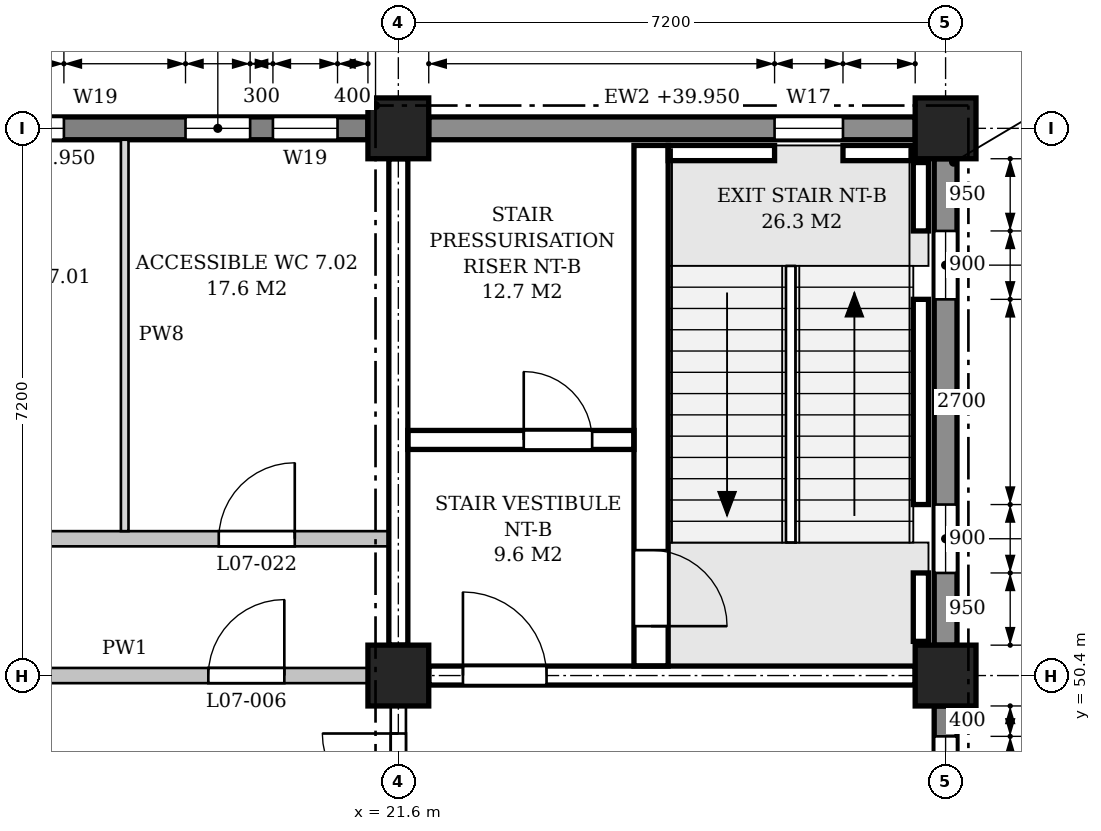
"""IFC4 building model, lengths in metres.
Left out: names, types, materials, properties, quantities, classifications, styles, units other than length and angle.
Written with IfcOpenShell. Run it as: python <this file> out.ifc"""

import sys

from ifc_helpers import new_model, si_unit, direction, frame, frame_2d, origin, origin_2d, place, context, subcontext, project, spatial, polyline, rectangle, outline, extrude, element, fill, save


model = new_model("IFC4")
c1 = context("Model", 3, precision=1e-05, world=origin(), true_north=direction((0.0, 1.0)))
c2 = subcontext(c1, "Body", "Model", "MODEL_VIEW")
j1 = project(units=[si_unit("LENGTHUNIT", "METRE"), si_unit("PLANEANGLEUNIT", "RADIAN")], contexts=[c1])
p1 = place(None, origin())
s1 = spatial("IfcSite", under=j1, at=p1, CompositionType="ELEMENT")
p2 = place(p1, origin())
s2 = spatial("IfcBuilding", under=s1, at=p2, CompositionType="ELEMENT")
p3 = place(p2, frame((0.0, 0.0, 36.0)))
s3 = spatial("IfcBuildingStorey", under=s2, at=p3, CompositionType="ELEMENT", Elevation=36.0)
for number, where, z_axis, x_axis in (
    (1, (21.6, 50.4, 0.0), (0.0, 0.0, 1.0), (1.0, 0.0, 0.0)),
    (2, (21.6, 57.6, 0.0), (0.0, 0.0, 1.0), (1.0, 0.0, 0.0)),
    (3, (28.8, 50.4, 0.0), (0.0, 0.0, 1.0), (1.0, 0.0, 0.0)),
    (4, (28.8, 57.6, 0.0), (0.0, 0.0, 1.0), (1.0, 0.0, 0.0)),
):
    element("IfcColumn", number, at=place(p3, frame(where, z_axis=z_axis, x_axis=x_axis)), inside=s3, PredefinedType="COLUMN", context=c2, shape_type="SweptSolid", body=[
        extrude(rectangle(XDim=0.8, YDim=0.8, at=origin_2d()), origin(), (0.0, 0.0, 1.0), 4.8),
    ])
p4 = place(p3, frame((28.4, 57.6, 0.0), z_axis=(0.0, 0.0, 1.0), x_axis=(-1.0, 0.0, 0.0)))
e5 = element("IfcWall", 5, at=p4, inside=s3, PredefinedType="STANDARD", context=c2, shape_type="SweptSolid", body=[
    extrude(rectangle(XDim=6.4, YDim=0.3, at=frame_2d((3.2, 0.0))), origin(), (0.0, 0.0, 1.0), 3.95),
])
p5 = place(p4, frame((0.95, 0.0, 0.9)))
e6 = element("IfcOpeningElement", 6, at=p5, cuts=e5, PredefinedType="OPENING", context=c2, shape_type="SweptSolid", body=[
    extrude(outline(polyline([(0.0, 0.0), (0.9, 0.0), (0.9, 2.55), (0.45, 3.0), (0.0, 2.55), (0.0, 0.0)])), frame((0.0, 0.16, 0.0), z_axis=(0.0, -1.0, 0.0), x_axis=(1.0, 0.0, 0.0)), (0.0, 0.0, 1.0), 0.32),
])
p6 = place(p3, frame((21.2, 57.6, 0.0), z_axis=(0.0, 0.0, 1.0), x_axis=(-1.0, 0.0, 0.0)))
e7 = element("IfcWall", 7, at=p6, inside=s3, PredefinedType="STANDARD", context=c2, shape_type="SweptSolid", body=[
    extrude(rectangle(XDim=6.4, YDim=0.3, at=frame_2d((3.2, 0.0))), origin(), (0.0, 0.0, 1.0), 3.95),
])
p7 = place(p6, frame((0.4, 0.0, 0.9)))
e8 = element("IfcOpeningElement", 8, at=p7, cuts=e7, PredefinedType="OPENING", context=c2, shape_type="SweptSolid", body=[
    extrude(outline(polyline([(0.0, 0.0), (0.85, 0.0), (0.85, 2.55), (0.425, 3.0), (0.0, 2.55), (0.0, 0.0)])), frame((0.0, 0.16, 0.0), z_axis=(0.0, -1.0, 0.0), x_axis=(1.0, 0.0, 0.0)), (0.0, 0.0, 1.0), 0.32),
])
p8 = place(p6, frame((1.55, 0.0, 0.9)))
e9 = element("IfcOpeningElement", 9, at=p8, cuts=e7, PredefinedType="OPENING", context=c2, shape_type="SweptSolid", body=[
    extrude(outline(polyline([(0.0, 0.0), (0.85, 0.0), (0.85, 2.55), (0.425, 3.0), (0.0, 2.55), (0.0, 0.0)])), frame((0.0, 0.16, 0.0), z_axis=(0.0, -1.0, 0.0), x_axis=(1.0, 0.0, 0.0)), (0.0, 0.0, 1.0), 0.32),
])
p9 = place(p6, frame((4.0, 0.0, 0.9)))
e10 = element("IfcOpeningElement", 10, at=p9, cuts=e7, PredefinedType="OPENING", context=c2, shape_type="SweptSolid", body=[
    extrude(outline(polyline([(0.0, 0.0), (0.85, 0.0), (0.85, 2.55), (0.425, 3.0), (0.0, 2.55), (0.0, 0.0)])), frame((0.0, 0.16, 0.0), z_axis=(0.0, -1.0, 0.0), x_axis=(1.0, 0.0, 0.0)), (0.0, 0.0, 1.0), 0.32),
])
p10 = place(p6, frame((5.15, 0.0, 0.9)))
e11 = element("IfcOpeningElement", 11, at=p10, cuts=e7, PredefinedType="OPENING", context=c2, shape_type="SweptSolid", body=[
    extrude(outline(polyline([(0.0, 0.0), (0.85, 0.0), (0.85, 2.55), (0.425, 3.0), (0.0, 2.55), (0.0, 0.0)])), frame((0.0, 0.16, 0.0), z_axis=(0.0, -1.0, 0.0), x_axis=(1.0, 0.0, 0.0)), (0.0, 0.0, 1.0), 0.32),
])
p11 = place(p3, frame((28.8, 43.6, 0.0), z_axis=(0.0, 0.0, 1.0), x_axis=(0.0, 1.0, 0.0)))
e12 = element("IfcWall", 12, at=p11, inside=s3, PredefinedType="STANDARD", context=c2, shape_type="SweptSolid", body=[
    extrude(rectangle(XDim=6.4, YDim=0.3, at=frame_2d((3.2, 0.0))), origin(), (0.0, 0.0, 1.0), 3.95),
])
p12 = place(p11, frame((4.0, 0.0, 0.9)))
e13 = element("IfcOpeningElement", 13, at=p12, cuts=e12, PredefinedType="OPENING", context=c2, shape_type="SweptSolid", body=[
    extrude(outline(polyline([(0.0, 0.0), (0.85, 0.0), (0.85, 2.55), (0.425, 3.0), (0.0, 2.55), (0.0, 0.0)])), frame((0.0, 0.16, 0.0), z_axis=(0.0, -1.0, 0.0), x_axis=(1.0, 0.0, 0.0)), (0.0, 0.0, 1.0), 0.32),
])
p13 = place(p11, frame((5.15, 0.0, 0.9)))
e14 = element("IfcOpeningElement", 14, at=p13, cuts=e12, PredefinedType="OPENING", context=c2, shape_type="SweptSolid", body=[
    extrude(outline(polyline([(0.0, 0.0), (0.85, 0.0), (0.85, 2.55), (0.425, 3.0), (0.0, 2.55), (0.0, 0.0)])), frame((0.0, 0.16, 0.0), z_axis=(0.0, -1.0, 0.0), x_axis=(1.0, 0.0, 0.0)), (0.0, 0.0, 1.0), 0.32),
])
p14 = place(p3, frame((28.8, 50.8, 0.0), z_axis=(0.0, 0.0, 1.0), x_axis=(0.0, 1.0, 0.0)))
e15 = element("IfcWall", 15, at=p14, inside=s3, PredefinedType="STANDARD", context=c2, shape_type="SweptSolid", body=[
    extrude(rectangle(XDim=6.4, YDim=0.3, at=frame_2d((3.2, 0.0))), origin(), (0.0, 0.0, 1.0), 3.95),
])
p15 = place(p14, frame((0.95, 0.0, 0.9)))
e16 = element("IfcOpeningElement", 16, at=p15, cuts=e15, PredefinedType="OPENING", context=c2, shape_type="SweptSolid", body=[
    extrude(outline(polyline([(0.0, 0.0), (0.9, 0.0), (0.9, 2.55), (0.45, 3.0), (0.0, 2.55), (0.0, 0.0)])), frame((0.0, 0.16, 0.0), z_axis=(0.0, -1.0, 0.0), x_axis=(1.0, 0.0, 0.0)), (0.0, 0.0, 1.0), 0.32),
])
p16 = place(p14, frame((4.55, 0.0, 0.9)))
e17 = element("IfcOpeningElement", 17, at=p16, cuts=e15, PredefinedType="OPENING", context=c2, shape_type="SweptSolid", body=[
    extrude(outline(polyline([(0.0, 0.0), (0.9, 0.0), (0.9, 2.55), (0.45, 3.0), (0.0, 2.55), (0.0, 0.0)])), frame((0.0, 0.16, 0.0), z_axis=(0.0, -1.0, 0.0), x_axis=(1.0, 0.0, 0.0)), (0.0, 0.0, 1.0), 0.32),
])
p17 = place(p3, frame((22.0, 50.4, 0.0), z_axis=(0.0, 0.0, 1.0), x_axis=(1.0, 0.0, 0.0)))
e18 = element("IfcWall", 18, at=p17, inside=s3, PredefinedType="SHEAR", context=c2, shape_type="SweptSolid", body=[
    extrude(rectangle(XDim=6.4, YDim=0.25, at=frame_2d((3.2, 0.0))), origin(), (0.0, 0.0, 1.0), 3.85),
])
p18 = place(p17, frame((0.45, 0.0, 0.0)))
e19 = element("IfcOpeningElement", 19, at=p18, cuts=e18, PredefinedType="OPENING", context=c2, shape_type="SweptSolid", body=[
    extrude(rectangle(XDim=1.1, YDim=2.1, at=frame_2d((0.55, 1.05))), frame((0.0, 0.135, 0.0), z_axis=(0.0, -1.0, 0.0), x_axis=(1.0, 0.0, 0.0)), (0.0, 0.0, 1.0), 0.27),
])
p19 = place(p3, frame((21.6, 50.8, 0.0), z_axis=(0.0, 0.0, 1.0), x_axis=(0.0, 1.0, 0.0)))
e20 = element("IfcWall", 20, at=p19, inside=s3, PredefinedType="SHEAR", context=c2, shape_type="SweptSolid", body=[
    extrude(rectangle(XDim=6.4, YDim=0.25, at=frame_2d((3.2, 0.0))), origin(), (0.0, 0.0, 1.0), 3.85),
])
p20 = place(p3, frame((28.475, 50.85, -0.25), z_axis=(0.0, 0.0, 1.0), x_axis=(0.0, 1.0, 0.0)))
e21 = element("IfcWall", 21, at=p20, inside=s3, PredefinedType="SHEAR", context=c2, shape_type="SweptSolid", body=[
    extrude(rectangle(XDim=0.9, YDim=0.2, at=frame_2d((0.45, 0.0))), origin(), (0.0, 0.0, 1.0), 4.8),
])
p21 = place(p3, frame((28.475, 52.65, -0.25), z_axis=(0.0, 0.0, 1.0), x_axis=(0.0, 1.0, 0.0)))
e22 = element("IfcWall", 22, at=p21, inside=s3, PredefinedType="SHEAR", context=c2, shape_type="SweptSolid", body=[
    extrude(rectangle(XDim=2.7, YDim=0.2, at=frame_2d((1.35, 0.0))), origin(), (0.0, 0.0, 1.0), 4.8),
])
p22 = place(p3, frame((28.475, 56.25, -0.25), z_axis=(0.0, 0.0, 1.0), x_axis=(0.0, 1.0, 0.0)))
e23 = element("IfcWall", 23, at=p22, inside=s3, PredefinedType="SHEAR", context=c2, shape_type="SweptSolid", body=[
    extrude(rectangle(XDim=0.9, YDim=0.2, at=frame_2d((0.45, 0.0))), origin(), (0.0, 0.0, 1.0), 4.8),
])
p23 = place(p3, frame((25.15, 57.275, -0.25), z_axis=(0.0, 0.0, 1.0), x_axis=(1.0, 0.0, 0.0)))
e24 = element("IfcWall", 24, at=p23, inside=s3, PredefinedType="SHEAR", context=c2, shape_type="SweptSolid", body=[
    extrude(rectangle(XDim=1.4, YDim=0.2, at=frame_2d((0.7, 0.0))), origin(), (0.0, 0.0, 1.0), 4.8),
])
p24 = place(p3, frame((27.45, 57.275, -0.25), z_axis=(0.0, 0.0, 1.0), x_axis=(1.0, 0.0, 0.0)))
e25 = element("IfcWall", 25, at=p24, inside=s3, PredefinedType="SHEAR", context=c2, shape_type="SweptSolid", body=[
    extrude(rectangle(XDim=0.9, YDim=0.2, at=frame_2d((0.45, 0.0))), origin(), (0.0, 0.0, 1.0), 4.8),
])
p25 = place(p3, frame((24.925, 50.525, 0.0), z_axis=(0.0, 0.0, 1.0), x_axis=(0.0, 1.0, 0.0)))
e26 = element("IfcWall", 26, at=p25, inside=s3, PredefinedType="SHEAR", context=c2, shape_type="SweptSolid", body=[
    extrude(rectangle(XDim=6.85, YDim=0.45, at=frame_2d((3.425, 0.0))), origin(), (0.0, 0.0, 1.0), 4.55),
])
p26 = place(p25, frame((0.525, 0.0, 0.0)))
e27 = element("IfcOpeningElement", 27, at=p26, cuts=e26, PredefinedType="OPENING", context=c2, shape_type="SweptSolid", body=[
    extrude(rectangle(XDim=1.0, YDim=2.1, at=frame_2d((0.5, 1.05))), frame((0.0, 0.235, 0.0), z_axis=(0.0, -1.0, 0.0), x_axis=(1.0, 0.0, 0.0)), (0.0, 0.0, 1.0), 0.47),
])
p27 = place(p3, frame((21.725, 53.5, 0.0), z_axis=(0.0, 0.0, 1.0), x_axis=(1.0, 0.0, 0.0)))
e28 = element("IfcWall", 28, at=p27, inside=s3, PredefinedType="SHEAR", context=c2, shape_type="SweptSolid", body=[
    extrude(rectangle(XDim=2.975, YDim=0.25, at=frame_2d((1.487, 0.0))), origin(), (0.0, 0.0, 1.0), 4.55),
])
p28 = place(p27, frame((1.525, 0.0, 0.0)))
e29 = element("IfcOpeningElement", 29, at=p28, cuts=e28, PredefinedType="OPENING", context=c2, shape_type="SweptSolid", body=[
    extrude(rectangle(XDim=0.9, YDim=2.1, at=frame_2d((0.45, 1.05))), frame((0.0, 0.135, 0.0), z_axis=(0.0, -1.0, 0.0), x_axis=(1.0, 0.0, 0.0)), (0.0, 0.0, 1.0), 0.27),
])
p29 = place(p3, frame((14.8, 50.4, 0.0), z_axis=(0.0, 0.0, 1.0), x_axis=(1.0, 0.0, 0.0)))
e30 = element("IfcWall", 30, at=p29, inside=s3, PredefinedType="PARTITIONING", context=c2, shape_type="SweptSolid", body=[
    extrude(rectangle(XDim=6.4, YDim=0.2, at=frame_2d((3.2, 0.0))), origin(), (0.0, 0.0, 1.0), 3.85),
])
p30 = place(p29, frame((4.3, 0.0, 0.0)))
e31 = element("IfcOpeningElement", 31, at=p30, cuts=e30, PredefinedType="OPENING", context=c2, shape_type="SweptSolid", body=[
    extrude(rectangle(XDim=1.0, YDim=2.1, at=frame_2d((0.5, 1.05))), frame((0.0, 0.11, 0.0), z_axis=(0.0, -1.0, 0.0), x_axis=(1.0, 0.0, 0.0)), (0.0, 0.0, 1.0), 0.22),
])
p31 = place(p3, frame((7.325, 52.2, 0.0), z_axis=(0.0, 0.0, 1.0), x_axis=(1.0, 0.0, 0.0)))
e32 = element("IfcWall", 32, at=p31, inside=s3, PredefinedType="PARTITIONING", context=c2, shape_type="SweptSolid", body=[
    extrude(outline(polyline([(0.0, 0.0), (14.15, 0.0), (14.15, 3.85), (14.05, 3.85), (14.05, 4.55), (7.3, 4.55), (7.3, 3.85), (6.85, 3.85), (6.85, 4.55), (0.1, 4.55), (0.1, 3.85), (0.0, 3.85), (0.0, 0.0)])), frame((0.0, 0.1, 0.0), z_axis=(0.0, -1.0, 0.0), x_axis=(1.0, 0.0, 0.0)), (0.0, 0.0, 1.0), 0.2),
])
p32 = place(p31, frame((1.238, 0.0, 0.0)))
e33 = element("IfcOpeningElement", 33, at=p32, cuts=e32, PredefinedType="OPENING", context=c2, shape_type="SweptSolid", body=[
    extrude(rectangle(XDim=1.0, YDim=2.1, at=frame_2d((0.5, 1.05))), frame((0.0, 0.11, 0.0), z_axis=(0.0, -1.0, 0.0), x_axis=(1.0, 0.0, 0.0)), (0.0, 0.0, 1.0), 0.22),
])
p33 = place(p31, frame((4.775, 0.0, 0.0)))
e34 = element("IfcOpeningElement", 34, at=p33, cuts=e32, PredefinedType="OPENING", context=c2, shape_type="SweptSolid", body=[
    extrude(rectangle(XDim=1.0, YDim=2.1, at=frame_2d((0.5, 1.05))), frame((0.0, 0.11, 0.0), z_axis=(0.0, -1.0, 0.0), x_axis=(1.0, 0.0, 0.0)), (0.0, 0.0, 1.0), 0.22),
])
p34 = place(p31, frame((8.375, 0.0, 0.0)))
e35 = element("IfcOpeningElement", 35, at=p34, cuts=e32, PredefinedType="OPENING", context=c2, shape_type="SweptSolid", body=[
    extrude(rectangle(XDim=1.0, YDim=2.1, at=frame_2d((0.5, 1.05))), frame((0.0, 0.11, 0.0), z_axis=(0.0, -1.0, 0.0), x_axis=(1.0, 0.0, 0.0)), (0.0, 0.0, 1.0), 0.22),
])
p35 = place(p31, frame((11.913, 0.0, 0.0)))
e36 = element("IfcOpeningElement", 36, at=p35, cuts=e32, PredefinedType="OPENING", context=c2, shape_type="SweptSolid", body=[
    extrude(rectangle(XDim=1.0, YDim=2.1, at=frame_2d((0.5, 1.05))), frame((0.0, 0.11, 0.0), z_axis=(0.0, -1.0, 0.0), x_axis=(1.0, 0.0, 0.0)), (0.0, 0.0, 1.0), 0.22),
])
p36 = place(p3, frame((18.0, 52.3, 0.0), z_axis=(0.0, 0.0, 1.0), x_axis=(0.0, 1.0, 0.0)))
e37 = element("IfcWall", 37, at=p36, inside=s3, PredefinedType="PARTITIONING", context=c2, shape_type="SweptSolid", body=[
    extrude(rectangle(XDim=5.15, YDim=0.1, at=frame_2d((2.575, 0.0))), origin(), (0.0, 0.0, 1.0), 3.85),
])
p37 = place(p3, frame((21.6, 47.275, 0.0), z_axis=(0.0, 0.0, 1.0), x_axis=(0.0, 1.0, 0.0)))
e38 = element("IfcWall", 38, at=p37, inside=s3, PredefinedType="PARTITIONING", context=c2, shape_type="SweptSolid", body=[
    extrude(rectangle(XDim=2.725, YDim=0.2, at=frame_2d((1.363, 0.0))), origin(), (0.0, 0.0, 1.0), 3.85),
])
p38 = place(p37, frame((0.363, 0.0, 0.0)))
e39 = element("IfcOpeningElement", 39, at=p38, cuts=e38, PredefinedType="OPENING", context=c2, shape_type="SweptSolid", body=[
    extrude(rectangle(XDim=2.0, YDim=2.4, at=frame_2d((1.0, 1.2))), frame((0.0, 0.11, 0.0), z_axis=(0.0, -1.0, 0.0), x_axis=(1.0, 0.0, 0.0)), (0.0, 0.0, 1.0), 0.22),
])
p39 = place(p13, origin())
e40 = element("IfcWindow", 40, at=p39, inside=s3, PartitioningType="SINGLE_PANEL", PredefinedType="WINDOW", context=c2, shape_type="SweptSolid", body=[
    extrude(outline(polyline([(0.0, 0.0), (0.85, 0.0), (0.85, 2.55), (0.425, 3.0), (0.0, 2.55), (0.0, 0.0)])), frame((0.0, 0.03, 0.0), z_axis=(0.0, -1.0, 0.0), x_axis=(1.0, 0.0, 0.0)), (0.0, 0.0, 1.0), 0.06),
])
fill(e14, e40)
p40 = place(p15, origin())
e41 = element("IfcWindow", 41, at=p40, inside=s3, PartitioningType="SINGLE_PANEL", PredefinedType="WINDOW", context=c2, shape_type="SweptSolid", body=[
    extrude(outline(polyline([(0.0, 0.0), (0.9, 0.0), (0.9, 2.55), (0.45, 3.0), (0.0, 2.55), (0.0, 0.0)])), frame((0.0, 0.03, 0.0), z_axis=(0.0, -1.0, 0.0), x_axis=(1.0, 0.0, 0.0)), (0.0, 0.0, 1.0), 0.06),
])
fill(e16, e41)
p41 = place(p16, origin())
e42 = element("IfcWindow", 42, at=p41, inside=s3, PartitioningType="SINGLE_PANEL", PredefinedType="WINDOW", context=c2, shape_type="SweptSolid", body=[
    extrude(outline(polyline([(0.0, 0.0), (0.9, 0.0), (0.9, 2.55), (0.45, 3.0), (0.0, 2.55), (0.0, 0.0)])), frame((0.0, 0.03, 0.0), z_axis=(0.0, -1.0, 0.0), x_axis=(1.0, 0.0, 0.0)), (0.0, 0.0, 1.0), 0.06),
])
fill(e17, e42)
p42 = place(p5, origin())
e43 = element("IfcWindow", 43, at=p42, inside=s3, PartitioningType="SINGLE_PANEL", PredefinedType="WINDOW", context=c2, shape_type="SweptSolid", body=[
    extrude(outline(polyline([(0.0, 0.0), (0.9, 0.0), (0.9, 2.55), (0.45, 3.0), (0.0, 2.55), (0.0, 0.0)])), frame((0.0, 0.03, 0.0), z_axis=(0.0, -1.0, 0.0), x_axis=(1.0, 0.0, 0.0)), (0.0, 0.0, 1.0), 0.06),
])
fill(e6, e43)
p43 = place(p7, origin())
e44 = element("IfcWindow", 44, at=p43, inside=s3, PartitioningType="SINGLE_PANEL", PredefinedType="WINDOW", context=c2, shape_type="SweptSolid", body=[
    extrude(outline(polyline([(0.0, 0.0), (0.85, 0.0), (0.85, 2.55), (0.425, 3.0), (0.0, 2.55), (0.0, 0.0)])), frame((0.0, 0.03, 0.0), z_axis=(0.0, -1.0, 0.0), x_axis=(1.0, 0.0, 0.0)), (0.0, 0.0, 1.0), 0.06),
])
fill(e8, e44)
p44 = place(p8, origin())
e45 = element("IfcWindow", 45, at=p44, inside=s3, PartitioningType="SINGLE_PANEL", PredefinedType="WINDOW", context=c2, shape_type="SweptSolid", body=[
    extrude(outline(polyline([(0.0, 0.0), (0.85, 0.0), (0.85, 2.55), (0.425, 3.0), (0.0, 2.55), (0.0, 0.0)])), frame((0.0, 0.03, 0.0), z_axis=(0.0, -1.0, 0.0), x_axis=(1.0, 0.0, 0.0)), (0.0, 0.0, 1.0), 0.06),
])
fill(e9, e45)
p45 = place(p9, origin())
e46 = element("IfcWindow", 46, at=p45, inside=s3, PartitioningType="SINGLE_PANEL", PredefinedType="WINDOW", context=c2, shape_type="SweptSolid", body=[
    extrude(outline(polyline([(0.0, 0.0), (0.85, 0.0), (0.85, 2.55), (0.425, 3.0), (0.0, 2.55), (0.0, 0.0)])), frame((0.0, 0.03, 0.0), z_axis=(0.0, -1.0, 0.0), x_axis=(1.0, 0.0, 0.0)), (0.0, 0.0, 1.0), 0.06),
])
fill(e10, e46)
p46 = place(p26, frame((1.0, 0.0, 0.0), z_axis=(0.0, 0.0, 1.0), x_axis=(-1.0, 0.0, 0.0)))
e47 = element("IfcDoor", 47, at=p46, inside=s3, OperationType="SINGLE_SWING_RIGHT", PredefinedType="DOOR", context=c2, shape_type="SweptSolid", body=[
    extrude(rectangle(XDim=1.0, YDim=2.1, at=frame_2d((0.5, 1.05))), frame((0.0, 0.025, 0.0), z_axis=(0.0, -1.0, 0.0), x_axis=(1.0, 0.0, 0.0)), (0.0, 0.0, 1.0), 0.05),
])
fill(e27, e47)
p47 = place(p18, origin())
e48 = element("IfcDoor", 48, at=p47, inside=s3, OperationType="SINGLE_SWING_LEFT", PredefinedType="DOOR", context=c2, shape_type="SweptSolid", body=[
    extrude(rectangle(XDim=1.1, YDim=2.1, at=frame_2d((0.55, 1.05))), frame((0.0, 0.025, 0.0), z_axis=(0.0, -1.0, 0.0), x_axis=(1.0, 0.0, 0.0)), (0.0, 0.0, 1.0), 0.05),
])
fill(e19, e48)
p48 = place(p28, origin())
e49 = element("IfcDoor", 49, at=p48, inside=s3, OperationType="SINGLE_SWING_LEFT", PredefinedType="DOOR", context=c2, shape_type="SweptSolid", body=[
    extrude(rectangle(XDim=0.9, YDim=2.1, at=frame_2d((0.45, 1.05))), frame((0.0, 0.025, 0.0), z_axis=(0.0, -1.0, 0.0), x_axis=(1.0, 0.0, 0.0)), (0.0, 0.0, 1.0), 0.05),
])
fill(e29, e49)
p49 = place(p38, origin())
e50 = element("IfcDoor", 50, at=p49, inside=s3, OperationType="DOUBLE_DOOR_SINGLE_SWING", PredefinedType="DOOR", context=c2, shape_type="SweptSolid", body=[
    extrude(rectangle(XDim=2.0, YDim=2.4, at=frame_2d((1.0, 1.2))), frame((0.0, 0.025, 0.0), z_axis=(0.0, -1.0, 0.0), x_axis=(1.0, 0.0, 0.0)), (0.0, 0.0, 1.0), 0.05),
])
fill(e39, e50)
p50 = place(p30, origin())
e51 = element("IfcDoor", 51, at=p50, inside=s3, OperationType="SINGLE_SWING_RIGHT", PredefinedType="DOOR", context=c2, shape_type="SweptSolid", body=[
    extrude(rectangle(XDim=1.0, YDim=2.1, at=frame_2d((0.5, 1.05))), frame((0.0, 0.025, 0.0), z_axis=(0.0, -1.0, 0.0), x_axis=(1.0, 0.0, 0.0)), (0.0, 0.0, 1.0), 0.05),
])
fill(e31, e51)
p51 = place(p35, origin())
e52 = element("IfcDoor", 52, at=p51, inside=s3, OperationType="SINGLE_SWING_RIGHT", PredefinedType="DOOR", context=c2, shape_type="SweptSolid", body=[
    extrude(rectangle(XDim=1.0, YDim=2.1, at=frame_2d((0.5, 1.05))), frame((0.0, 0.025, 0.0), z_axis=(0.0, -1.0, 0.0), x_axis=(1.0, 0.0, 0.0)), (0.0, 0.0, 1.0), 0.05),
])
fill(e36, e52)
save(model, sys.argv[1])
